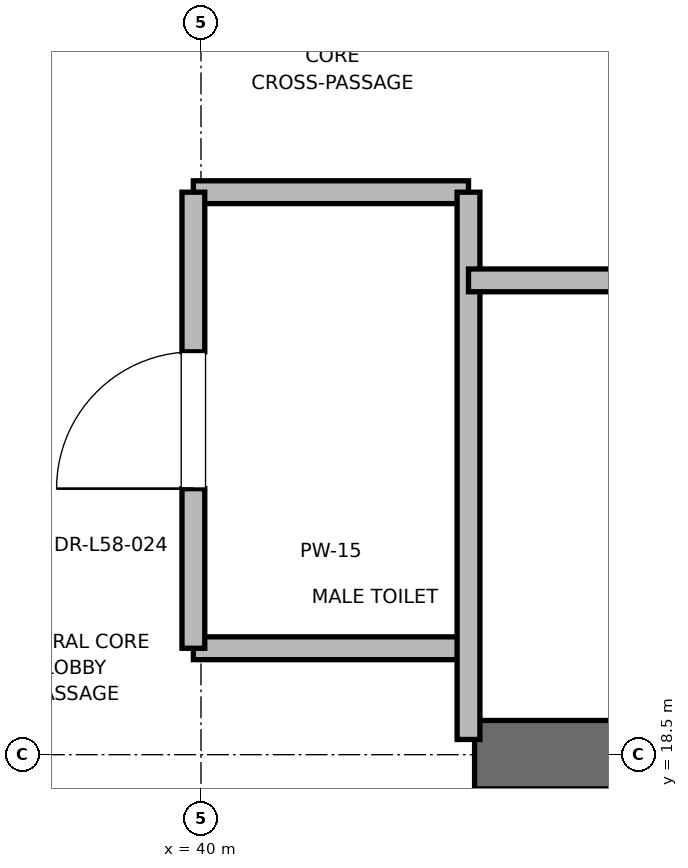
"""IFC4 building model, lengths in metres.
Left out: names, types, materials, properties, quantities, classifications, styles, units other than length and angle.
Written with IfcOpenShell. Run it as: python <this file> out.ifc"""

import sys

from ifc_helpers import new_model, si_unit, direction, frame, frame_2d, origin, place, context, subcontext, project, spatial, rectangle, extrude, element, fill, save


model = new_model("IFC4")
c1 = context("Model", 3, precision=1e-05, world=origin(), true_north=direction((0.0, 1.0)))
c2 = subcontext(c1, "Body", "Model", "MODEL_VIEW")
j1 = project(units=[si_unit("LENGTHUNIT", "METRE"), si_unit("PLANEANGLEUNIT", "RADIAN")], contexts=[c1])
p1 = place(None, origin())
s1 = spatial("IfcSite", under=j1, at=p1, CompositionType="ELEMENT")
p2 = place(p1, origin())
s2 = spatial("IfcBuilding", under=s1, at=p2, CompositionType="ELEMENT")
p3 = place(p2, frame((0.0, 0.0, 251.2)))
s3 = spatial("IfcBuildingStorey", under=s2, at=p3, CompositionType="ELEMENT", Elevation=251.2)
p4 = place(p3, frame((41.8, 18.5, 0.0), z_axis=(0.0, 0.0, 1.0), x_axis=(1.0, 0.0, 0.0)))
e1 = element("IfcWall", 1, at=p4, inside=s3, PredefinedType="SHEAR", context=c2, shape_type="SweptSolid", body=[
    extrude(rectangle(XDim=9.2, YDim=0.45, at=frame_2d((4.6, 0.0))), origin(), (0.0, 0.0, 1.0), 3.785),
])
for number, where, z_axis, x_axis in (
    (2, (39.95, 19.2, 0.0), (0.0, 0.0, 1.0), (1.0, 0.0, 0.0)),
    (3, (39.95, 22.2, 0.0), (0.0, 0.0, 1.0), (1.0, 0.0, 0.0)),
):
    element("IfcWall", number, at=place(p3, frame(where, z_axis=z_axis, x_axis=x_axis)), inside=s3, PredefinedType="PARTITIONING", context=c2, shape_type="SweptSolid", body=[
        extrude(rectangle(XDim=1.81, YDim=0.15, at=frame_2d((0.905, 0.0))), origin(), (0.0, 0.0, 1.0), 2.85),
    ])
p5 = place(p3, frame((41.76, 18.6, 0.0), z_axis=(0.0, 0.0, 1.0), x_axis=(0.0, 1.0, 0.0)))
e4 = element("IfcWall", 4, at=p5, inside=s3, PredefinedType="PARTITIONING", context=c2, shape_type="SweptSolid", body=[
    extrude(rectangle(XDim=3.6, YDim=0.15, at=frame_2d((1.8, 0.0))), origin(), (0.0, 0.0, 1.0), 2.85),
])
p6 = place(p3, frame((39.95, 19.2, 0.0), z_axis=(0.0, 0.0, 1.0), x_axis=(0.0, 1.0, 0.0)))
e5 = element("IfcWall", 5, at=p6, inside=s3, PredefinedType="PARTITIONING", context=c2, shape_type="SweptSolid", body=[
    extrude(rectangle(XDim=3.0, YDim=0.15, at=frame_2d((1.5, 0.0))), origin(), (0.0, 0.0, 1.0), 2.85),
])
p7 = place(p6, frame((1.05, 0.0, 0.0)))
e6 = element("IfcOpeningElement", 6, at=p7, cuts=e5, PredefinedType="OPENING", context=c2, shape_type="SweptSolid", body=[
    extrude(rectangle(XDim=0.9, YDim=2.1, at=frame_2d((0.45, 1.05))), frame((0.0, 0.075, 0.0), z_axis=(0.0, -1.0, 0.0), x_axis=(1.0, 0.0, 0.0)), (0.0, 0.0, 1.0), 0.15),
])
p8 = place(p3, frame((41.76, 21.62, 0.0), z_axis=(0.0, 0.0, 1.0), x_axis=(1.0, 0.0, 0.0)))
e7 = element("IfcWall", 7, at=p8, inside=s3, PredefinedType="PARTITIONING", context=c2, shape_type="SweptSolid", body=[
    extrude(rectangle(XDim=5.98, YDim=0.15, at=frame_2d((2.99, 0.0))), origin(), (0.0, 0.0, 1.0), 2.85),
])
p9 = place(p8, frame((2.49, 0.0, 0.0)))
e8 = element("IfcOpeningElement", 8, at=p9, cuts=e7, PredefinedType="OPENING", context=c2, shape_type="SweptSolid", body=[
    extrude(rectangle(XDim=1.0, YDim=2.15, at=frame_2d((0.5, 1.075))), frame((0.0, 0.075, 0.0), z_axis=(0.0, -1.0, 0.0), x_axis=(1.0, 0.0, 0.0)), (0.0, 0.0, 1.0), 0.15),
])
p10 = place(p7, origin())
e9 = element("IfcDoor", 9, at=p10, inside=s3, OperationType="SINGLE_SWING_LEFT", PredefinedType="DOOR", context=c2, shape_type="SweptSolid", body=[
    extrude(rectangle(XDim=0.9, YDim=2.1, at=frame_2d((0.45, 1.05))), frame((0.0, 0.025, 0.0), z_axis=(0.0, -1.0, 0.0), x_axis=(1.0, 0.0, 0.0)), (0.0, 0.0, 1.0), 0.05),
])
fill(e6, e9)
save(model, sys.argv[1])
